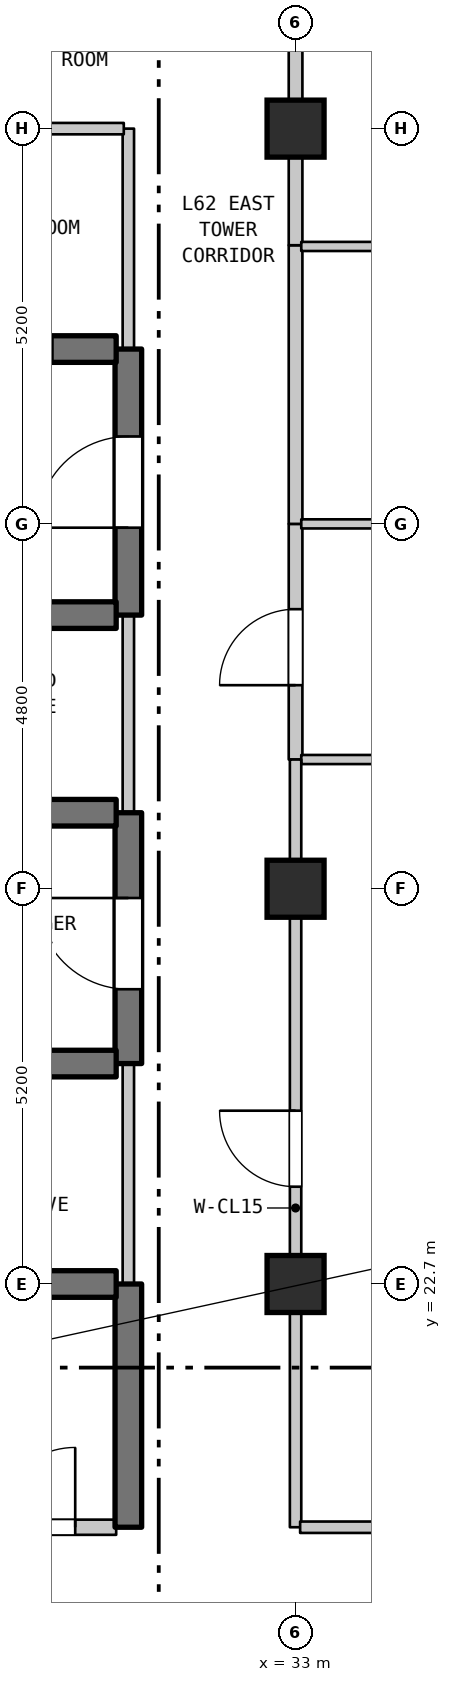
"""IFC4 building model, lengths in metres.
Left out: names, types, materials, properties, quantities, classifications, styles, units other than length and angle.
Written with IfcOpenShell. Run it as: python <this file> out.ifc"""

import sys

from ifc_helpers import new_model, si_unit, direction, frame, frame_2d, origin, origin_2d, place, context, subcontext, project, spatial, rectangle, extrude, element, fill, save


model = new_model("IFC4")
c1 = context("Model", 3, precision=1e-05, world=origin(), true_north=direction((0.0, 1.0)))
c2 = subcontext(c1, "Body", "Model", "MODEL_VIEW")
j1 = project(units=[si_unit("LENGTHUNIT", "METRE"), si_unit("PLANEANGLEUNIT", "RADIAN")], contexts=[c1])
p1 = place(None, origin())
s1 = spatial("IfcSite", under=j1, at=p1, CompositionType="ELEMENT")
p2 = place(p1, origin())
s2 = spatial("IfcBuilding", under=s1, at=p2, CompositionType="ELEMENT")
p3 = place(p2, frame((0.0, 0.0, 251.0)))
s3 = spatial("IfcBuildingStorey", under=s2, at=p3, CompositionType="ELEMENT", Elevation=251.0)
for number, where, z_axis, x_axis in (
    (1, (33.0, 22.7, 0.0), (0.0, 0.0, 1.0), (1.0, 0.0, 0.0)),
    (2, (33.0, 27.9, 0.0), (0.0, 0.0, 1.0), (1.0, 0.0, 0.0)),
    (3, (33.0, 37.9, 0.0), (0.0, 0.0, 1.0), (1.0, 0.0, 0.0)),
):
    element("IfcColumn", number, at=place(p3, frame(where, z_axis=z_axis, x_axis=x_axis)), inside=s3, PredefinedType="COLUMN", context=c2, shape_type="SweptSolid", body=[
        extrude(rectangle(XDim=0.75, YDim=0.75, at=origin_2d()), origin(), (0.0, 0.0, 1.0), 3.7),
    ])
p4 = place(p3, frame((30.8, 19.5, 0.0), z_axis=(0.0, 0.0, 1.0), x_axis=(0.0, 1.0, 0.0)))
e4 = element("IfcWall", 4, at=p4, inside=s3, PredefinedType="SHEAR", context=c2, shape_type="SweptSolid", body=[
    extrude(rectangle(XDim=3.2, YDim=0.35, at=frame_2d((1.6, 0.0))), origin(), (0.0, 0.0, 1.0), 3.39),
])
p5 = place(p3, frame((30.8, 22.7, 0.0), z_axis=(0.0, 0.0, 1.0), x_axis=(0.0, 1.0, 0.0)))
e5 = element("IfcWall", 5, at=p5, inside=s3, PredefinedType="STANDARD", context=c2, shape_type="SweptSolid", body=[
    extrude(rectangle(XDim=2.9, YDim=0.15, at=frame_2d((1.45, 0.0))), origin(), (0.0, 0.0, 1.0), 3.39),
])
p6 = place(p3, frame((30.8, 25.6, 0.0), z_axis=(0.0, 0.0, 1.0), x_axis=(0.0, 1.0, 0.0)))
e6 = element("IfcWall", 6, at=p6, inside=s3, PredefinedType="SHEAR", context=c2, shape_type="SweptSolid", body=[
    extrude(rectangle(XDim=3.3, YDim=0.35, at=frame_2d((1.65, 0.0))), origin(), (0.0, 0.0, 1.0), 3.39),
])
p7 = place(p6, frame((0.978, 0.0, 0.0)))
e7 = element("IfcOpeningElement", 7, at=p7, cuts=e6, PredefinedType="OPENING", context=c2, shape_type="SweptSolid", body=[
    extrude(rectangle(XDim=1.2, YDim=2.2, at=frame_2d((0.6, 1.1))), frame((0.0, 0.185, 0.0), z_axis=(0.0, -1.0, 0.0), x_axis=(1.0, 0.0, 0.0)), (0.0, 0.0, 1.0), 0.37),
])
p8 = place(p3, frame((30.8, 28.9, 0.0), z_axis=(0.0, 0.0, 1.0), x_axis=(0.0, 1.0, 0.0)))
e8 = element("IfcWall", 8, at=p8, inside=s3, PredefinedType="STANDARD", context=c2, shape_type="SweptSolid", body=[
    extrude(rectangle(XDim=2.6, YDim=0.15, at=frame_2d((1.3, 0.0))), origin(), (0.0, 0.0, 1.0), 3.39),
])
p9 = place(p3, frame((30.8, 31.5, 0.0), z_axis=(0.0, 0.0, 1.0), x_axis=(0.0, 1.0, 0.0)))
e9 = element("IfcWall", 9, at=p9, inside=s3, PredefinedType="SHEAR", context=c2, shape_type="SweptSolid", body=[
    extrude(rectangle(XDim=3.5, YDim=0.35, at=frame_2d((1.75, 0.0))), origin(), (0.0, 0.0, 1.0), 3.39),
])
p10 = place(p9, frame((1.15, 0.0, 0.0)))
e10 = element("IfcOpeningElement", 10, at=p10, cuts=e9, PredefinedType="OPENING", context=c2, shape_type="SweptSolid", body=[
    extrude(rectangle(XDim=1.2, YDim=2.2, at=frame_2d((0.6, 1.1))), frame((0.0, 0.185, 0.0), z_axis=(0.0, -1.0, 0.0), x_axis=(1.0, 0.0, 0.0)), (0.0, 0.0, 1.0), 0.37),
])
p11 = place(p3, frame((30.8, 35.0, 0.0), z_axis=(0.0, 0.0, 1.0), x_axis=(0.0, 1.0, 0.0)))
e11 = element("IfcWall", 11, at=p11, inside=s3, PredefinedType="STANDARD", context=c2, shape_type="SweptSolid", body=[
    extrude(rectangle(XDim=2.9, YDim=0.15, at=frame_2d((1.45, 0.0))), origin(), (0.0, 0.0, 1.0), 3.39),
])
p12 = place(p3, frame((33.0, 19.5, 0.0), z_axis=(0.0, 0.0, 1.0), x_axis=(0.0, 1.0, 0.0)))
e12 = element("IfcWall", 12, at=p12, inside=s3, PredefinedType="STANDARD", context=c2, shape_type="SweptSolid", body=[
    extrude(rectangle(XDim=8.4, YDim=0.15, at=frame_2d((4.2, 0.0))), origin(), (0.0, 0.0, 1.0), 3.1),
])
p13 = place(p12, frame((4.48, 0.0, 0.0)))
e13 = element("IfcOpeningElement", 13, at=p13, cuts=e12, PredefinedType="OPENING", context=c2, shape_type="SweptSolid", body=[
    extrude(rectangle(XDim=1.0, YDim=2.15, at=frame_2d((0.5, 1.075))), frame((0.0, 0.085, 0.0), z_axis=(0.0, -1.0, 0.0), x_axis=(1.0, 0.0, 0.0)), (0.0, 0.0, 1.0), 0.17),
])
p14 = place(p3, frame((33.0, 29.6, 0.0), z_axis=(0.0, 0.0, 1.0), x_axis=(0.0, 1.0, 0.0)))
e14 = element("IfcWall", 14, at=p14, inside=s3, PredefinedType="STANDARD", context=c2, shape_type="SweptSolid", body=[
    extrude(rectangle(XDim=3.1, YDim=0.18, at=frame_2d((1.55, 0.0))), origin(), (0.0, 0.0, 1.0), 2.89),
])
p15 = place(p14, frame((0.978, 0.0, 0.0)))
e15 = element("IfcOpeningElement", 15, at=p15, cuts=e14, PredefinedType="OPENING", context=c2, shape_type="SweptSolid", body=[
    extrude(rectangle(XDim=1.0, YDim=2.15, at=frame_2d((0.5, 1.075))), frame((0.0, 0.1, 0.0), z_axis=(0.0, -1.0, 0.0), x_axis=(1.0, 0.0, 0.0)), (0.0, 0.0, 1.0), 0.2),
])
p16 = place(p3, frame((33.0, 32.7, 0.0), z_axis=(0.0, 0.0, 1.0), x_axis=(0.0, 1.0, 0.0)))
e16 = element("IfcWall", 16, at=p16, inside=s3, PredefinedType="STANDARD", context=c2, shape_type="SweptSolid", body=[
    extrude(rectangle(XDim=3.666, YDim=0.18, at=frame_2d((1.833, 0.0))), origin(), (0.0, 0.0, 1.0), 2.89),
])
p17 = place(p3, frame((33.0, 36.366, 0.0), z_axis=(0.0, 0.0, 1.0), x_axis=(0.0, 1.0, 0.0)))
e17 = element("IfcWall", 17, at=p17, inside=s3, PredefinedType="STANDARD", context=c2, shape_type="SweptSolid", body=[
    extrude(rectangle(XDim=1.534, YDim=0.18, at=frame_2d((0.767, 0.0))), origin(), (0.0, 0.0, 1.0), 2.89),
])
p18 = place(p3, frame((28.585, 19.5, 0.0), z_axis=(0.0, 0.0, 1.0), x_axis=(1.0, 0.0, 0.0)))
e18 = element("IfcWall", 18, at=p18, inside=s3, PredefinedType="STANDARD", context=c2, shape_type="SweptSolid", body=[
    extrude(rectangle(XDim=2.055, YDim=0.2, at=frame_2d((1.027, 0.0))), origin(), (0.0, 0.0, 1.0), 3.39),
])
p19 = place(p18, frame((0.466, 0.0, 0.0)))
e19 = element("IfcOpeningElement", 19, at=p19, cuts=e18, PredefinedType="OPENING", context=c2, shape_type="SweptSolid", body=[
    extrude(rectangle(XDim=1.05, YDim=2.15, at=frame_2d((0.525, 1.075))), frame((0.0, 0.11, 0.0), z_axis=(0.0, -1.0, 0.0), x_axis=(1.0, 0.0, 0.0)), (0.0, 0.0, 1.0), 0.22),
])
p20 = place(p3, frame((33.06, 19.5, 0.0), z_axis=(0.0, 0.0, 1.0), x_axis=(1.0, 0.0, 0.0)))
e20 = element("IfcWall", 20, at=p20, inside=s3, PredefinedType="STANDARD", context=c2, shape_type="SweptSolid", body=[
    extrude(rectangle(XDim=8.323, YDim=0.15, at=frame_2d((4.162, 0.0))), origin(), (0.0, 0.0, 1.0), 3.39),
])
p21 = place(p20, frame((3.583, 0.0, 0.0)))
e21 = element("IfcOpeningElement", 21, at=p21, cuts=e20, PredefinedType="OPENING", context=c2, shape_type="SweptSolid", body=[
    extrude(rectangle(XDim=1.0, YDim=2.15, at=frame_2d((0.5, 1.075))), frame((0.0, 0.085, 0.0), z_axis=(0.0, -1.0, 0.0), x_axis=(1.0, 0.0, 0.0)), (0.0, 0.0, 1.0), 0.17),
])
p22 = place(p3, frame((28.585, 22.7, 0.0), z_axis=(0.0, 0.0, 1.0), x_axis=(1.0, 0.0, 0.0)))
e22 = element("IfcWall", 22, at=p22, inside=s3, PredefinedType="SHEAR", context=c2, shape_type="SweptSolid", body=[
    extrude(rectangle(XDim=2.055, YDim=0.35, at=frame_2d((1.027, 0.0))), origin(), (0.0, 0.0, 1.0), 3.39),
])
p23 = place(p3, frame((27.46, 25.6, 0.0), z_axis=(0.0, 0.0, 1.0), x_axis=(1.0, 0.0, 0.0)))
e23 = element("IfcWall", 23, at=p23, inside=s3, PredefinedType="SHEAR", context=c2, shape_type="SweptSolid", body=[
    extrude(rectangle(XDim=3.18, YDim=0.35, at=frame_2d((1.59, 0.0))), origin(), (0.0, 0.0, 1.0), 3.39),
])
p24 = place(p23, frame((1.115, 0.0, 0.0)))
e24 = element("IfcOpeningElement", 24, at=p24, cuts=e23, PredefinedType="OPENING", context=c2, shape_type="SweptSolid", body=[
    extrude(rectangle(XDim=0.95, YDim=2.15, at=frame_2d((0.475, 1.075))), frame((0.0, 0.185, 0.0), z_axis=(0.0, -1.0, 0.0), x_axis=(1.0, 0.0, 0.0)), (0.0, 0.0, 1.0), 0.37),
])
p25 = place(p3, frame((27.46, 28.9, 0.0), z_axis=(0.0, 0.0, 1.0), x_axis=(1.0, 0.0, 0.0)))
e25 = element("IfcWall", 25, at=p25, inside=s3, PredefinedType="SHEAR", context=c2, shape_type="SweptSolid", body=[
    extrude(rectangle(XDim=3.18, YDim=0.35, at=frame_2d((1.59, 0.0))), origin(), (0.0, 0.0, 1.0), 3.39),
])
p26 = place(p25, frame((1.115, 0.0, 0.0)))
e26 = element("IfcOpeningElement", 26, at=p26, cuts=e25, PredefinedType="OPENING", context=c2, shape_type="SweptSolid", body=[
    extrude(rectangle(XDim=0.95, YDim=2.15, at=frame_2d((0.475, 1.075))), frame((0.0, 0.185, 0.0), z_axis=(0.0, -1.0, 0.0), x_axis=(1.0, 0.0, 0.0)), (0.0, 0.0, 1.0), 0.37),
])
p27 = place(p3, frame((33.075, 29.6, 0.0), z_axis=(0.0, 0.0, 1.0), x_axis=(1.0, 0.0, 0.0)))
e27 = element("IfcWall", 27, at=p27, inside=s3, PredefinedType="PARTITIONING", context=c2, shape_type="SweptSolid", body=[
    extrude(rectangle(XDim=11.522, YDim=0.12, at=frame_2d((5.761, 0.0))), origin(), (0.0, 0.0, 1.0), 3.39),
])
p28 = place(p3, frame((27.46, 31.5, 0.0), z_axis=(0.0, 0.0, 1.0), x_axis=(1.0, 0.0, 0.0)))
e28 = element("IfcWall", 28, at=p28, inside=s3, PredefinedType="SHEAR", context=c2, shape_type="SweptSolid", body=[
    extrude(rectangle(XDim=3.18, YDim=0.35, at=frame_2d((1.59, 0.0))), origin(), (0.0, 0.0, 1.0), 3.39),
])
p29 = place(p3, frame((33.075, 32.7, 0.0), z_axis=(0.0, 0.0, 1.0), x_axis=(1.0, 0.0, 0.0)))
e29 = element("IfcWall", 29, at=p29, inside=s3, PredefinedType="PARTITIONING", context=c2, shape_type="SweptSolid", body=[
    extrude(rectangle(XDim=4.46, YDim=0.12, at=frame_2d((2.23, 0.0))), origin(), (0.0, 0.0, 1.0), 3.39),
])
p30 = place(p3, frame((28.045, 35.0, 0.0), z_axis=(0.0, 0.0, 1.0), x_axis=(1.0, 0.0, 0.0)))
e30 = element("IfcWall", 30, at=p30, inside=s3, PredefinedType="SHEAR", context=c2, shape_type="SweptSolid", body=[
    extrude(rectangle(XDim=2.595, YDim=0.35, at=frame_2d((1.297, 0.0))), origin(), (0.0, 0.0, 1.0), 3.39),
])
p31 = place(p30, frame((0.806, 0.0, 0.0)))
e31 = element("IfcOpeningElement", 31, at=p31, cuts=e30, PredefinedType="OPENING", context=c2, shape_type="SweptSolid", body=[
    extrude(rectangle(XDim=0.95, YDim=2.15, at=frame_2d((0.475, 1.075))), frame((0.0, 0.185, 0.0), z_axis=(0.0, -1.0, 0.0), x_axis=(1.0, 0.0, 0.0)), (0.0, 0.0, 1.0), 0.37),
])
p32 = place(p3, frame((33.075, 36.35, 0.0), z_axis=(0.0, 0.0, 1.0), x_axis=(1.0, 0.0, 0.0)))
e32 = element("IfcWall", 32, at=p32, inside=s3, PredefinedType="PARTITIONING", context=c2, shape_type="SweptSolid", body=[
    extrude(rectangle(XDim=4.46, YDim=0.12, at=frame_2d((2.23, 0.0))), origin(), (0.0, 0.0, 1.0), 3.39),
])
p33 = place(p3, frame((28.045, 37.9, 0.0), z_axis=(0.0, 0.0, 1.0), x_axis=(1.0, 0.0, 0.0)))
e33 = element("IfcWall", 33, at=p33, inside=s3, PredefinedType="STANDARD", context=c2, shape_type="SweptSolid", body=[
    extrude(rectangle(XDim=2.695, YDim=0.15, at=frame_2d((1.348, 0.0))), origin(), (0.0, 0.0, 1.0), 2.89),
])
p34 = place(p3, frame((33.0, 27.9, 0.0), z_axis=(0.0, 0.0, 1.0), x_axis=(0.0, 1.0, 0.0)))
e34 = element("IfcWall", 34, at=p34, inside=s3, PredefinedType="STANDARD", context=c2, shape_type="SweptSolid", body=[
    extrude(rectangle(XDim=1.7, YDim=0.15, at=frame_2d((0.85, 0.0))), origin(), (0.0, 0.0, 1.0), 2.89),
])
p35 = place(p3, frame((33.0, 37.9, 0.0), z_axis=(0.0, 0.0, 1.0), x_axis=(0.0, 1.0, 0.0)))
e35 = element("IfcWall", 35, at=p35, inside=s3, PredefinedType="STANDARD", context=c2, shape_type="SweptSolid", body=[
    extrude(rectangle(XDim=1.85, YDim=0.18, at=frame_2d((0.925, 0.0))), origin(), (0.0, 0.0, 1.0), 2.79),
])
p36 = place(p7, origin())
e36 = element("IfcDoor", 36, at=p36, inside=s3, OperationType="SINGLE_SWING_RIGHT", PredefinedType="DOOR", context=c2, shape_type="SweptSolid", body=[
    extrude(rectangle(XDim=1.2, YDim=2.2, at=frame_2d((0.6, 1.1))), frame((0.0, 0.025, 0.0), z_axis=(0.0, -1.0, 0.0), x_axis=(1.0, 0.0, 0.0)), (0.0, 0.0, 1.0), 0.05),
])
fill(e7, e36)
p37 = place(p10, origin())
e37 = element("IfcDoor", 37, at=p37, inside=s3, OperationType="SINGLE_SWING_LEFT", PredefinedType="DOOR", context=c2, shape_type="SweptSolid", body=[
    extrude(rectangle(XDim=1.2, YDim=2.2, at=frame_2d((0.6, 1.1))), frame((0.0, 0.025, 0.0), z_axis=(0.0, -1.0, 0.0), x_axis=(1.0, 0.0, 0.0)), (0.0, 0.0, 1.0), 0.05),
])
fill(e10, e37)
p38 = place(p13, origin())
e38 = element("IfcDoor", 38, at=p38, inside=s3, OperationType="SINGLE_SWING_RIGHT", PredefinedType="DOOR", context=c2, shape_type="SweptSolid", body=[
    extrude(rectangle(XDim=1.0, YDim=2.15, at=frame_2d((0.5, 1.075))), frame((0.0, 0.025, 0.0), z_axis=(0.0, -1.0, 0.0), x_axis=(1.0, 0.0, 0.0)), (0.0, 0.0, 1.0), 0.05),
])
fill(e13, e38)
p39 = place(p15, origin())
e39 = element("IfcDoor", 39, at=p39, inside=s3, OperationType="SINGLE_SWING_LEFT", PredefinedType="DOOR", context=c2, shape_type="SweptSolid", body=[
    extrude(rectangle(XDim=1.0, YDim=2.15, at=frame_2d((0.5, 1.075))), frame((0.0, 0.025, 0.0), z_axis=(0.0, -1.0, 0.0), x_axis=(1.0, 0.0, 0.0)), (0.0, 0.0, 1.0), 0.05),
])
fill(e15, e39)
p40 = place(p19, origin())
e40 = element("IfcDoor", 40, at=p40, inside=s3, OperationType="SINGLE_SWING_RIGHT", PredefinedType="DOOR", context=c2, shape_type="SweptSolid", body=[
    extrude(rectangle(XDim=1.05, YDim=2.15, at=frame_2d((0.525, 1.075))), frame((0.0, 0.025, 0.0), z_axis=(0.0, -1.0, 0.0), x_axis=(1.0, 0.0, 0.0)), (0.0, 0.0, 1.0), 0.05),
])
fill(e19, e40)
p41 = place(p31, frame((0.95, 0.0, 0.0), z_axis=(0.0, 0.0, 1.0), x_axis=(-1.0, 0.0, 0.0)))
e41 = element("IfcDoor", 41, at=p41, inside=s3, OperationType="SINGLE_SWING_LEFT", PredefinedType="DOOR", context=c2, shape_type="SweptSolid", body=[
    extrude(rectangle(XDim=0.95, YDim=2.15, at=frame_2d((0.475, 1.075))), frame((0.0, 0.025, 0.0), z_axis=(0.0, -1.0, 0.0), x_axis=(1.0, 0.0, 0.0)), (0.0, 0.0, 1.0), 0.05),
])
fill(e31, e41)
save(model, sys.argv[1])
